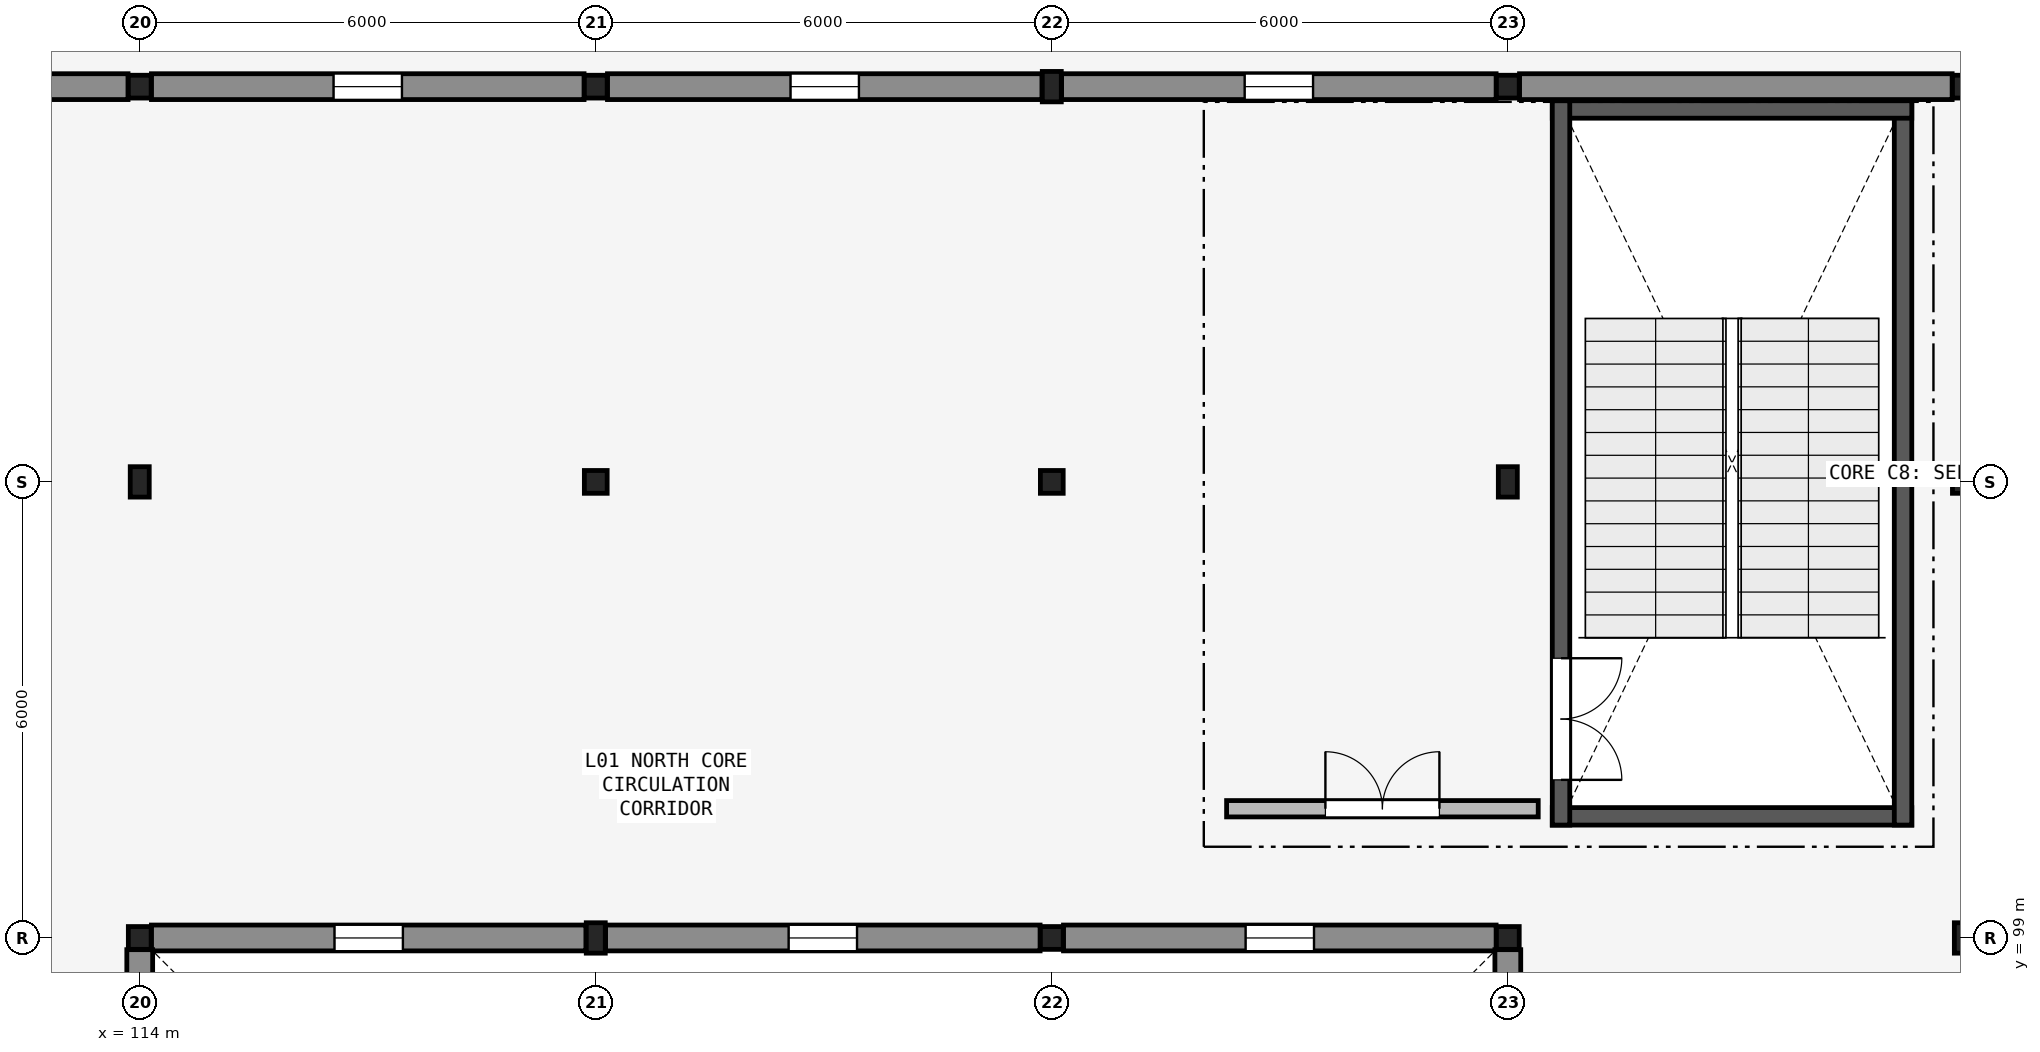
"""IFC4 building model, lengths in metres.
Left out: names, types, materials, properties, quantities, classifications, styles, units other than length and angle.
Written with IfcOpenShell. Run it as: python <this file> out.ifc"""

import sys

from ifc_helpers import new_model, si_unit, direction, frame, frame_2d, origin, origin_2d, place, context, subcontext, project, spatial, rectangle, hollow_rectangle, i_section, extrude, element, fill, save


model = new_model("IFC4")
c1 = context("Model", 3, precision=1e-05, world=origin(), true_north=direction((0.0, 1.0)))
c2 = subcontext(c1, "Body", "Model", "MODEL_VIEW")
j1 = project(units=[si_unit("LENGTHUNIT", "METRE"), si_unit("PLANEANGLEUNIT", "RADIAN")], contexts=[c1])
p1 = place(None, origin())
s1 = spatial("IfcSite", under=j1, at=p1, CompositionType="ELEMENT")
p2 = place(p1, origin())
s2 = spatial("IfcBuilding", under=s1, at=p2, CompositionType="ELEMENT")
p3 = place(p2, frame((0.0, 0.0, 4.8)))
s3 = spatial("IfcBuildingStorey", under=s2, at=p3, CompositionType="ELEMENT", Elevation=4.8)
p4 = place(p3, frame((114.0, 99.0, 0.0), z_axis=(0.0, 0.0, 1.0), x_axis=(1.0, 0.0, 0.0)))
e1 = element("IfcColumn", 1, at=p4, inside=s3, PredefinedType="COLUMN", context=c2, shape_type="SweptSolid", body=[
    extrude(hollow_rectangle(XDim=0.3, YDim=0.3, WallThickness=0.016, InnerFilletRadius=0.016, OuterFilletRadius=0.032, at=origin_2d()), origin(), (0.0, 0.0, 1.0), 4.5),
])
p5 = place(p3, frame((114.0, 105.0, 0.0), z_axis=(0.0, 0.0, 1.0), x_axis=(1.0, 0.0, 0.0)))
e2 = element("IfcColumn", 2, at=p5, inside=s3, PredefinedType="COLUMN", context=c2, shape_type="SweptSolid", body=[
    extrude(i_section(OverallWidth=0.25, OverallDepth=0.4, WebThickness=0.01, FlangeThickness=0.013, FilletRadius=0.014, at=origin_2d()), origin(), (0.0, 0.0, 1.0), 4.5),
])
p6 = place(p3, frame((114.0, 110.2, 0.0), z_axis=(0.0, 0.0, 1.0), x_axis=(1.0, 0.0, 0.0)))
e3 = element("IfcColumn", 3, at=p6, inside=s3, PredefinedType="COLUMN", context=c2, shape_type="SweptSolid", body=[
    extrude(hollow_rectangle(XDim=0.3, YDim=0.3, WallThickness=0.016, InnerFilletRadius=0.016, OuterFilletRadius=0.032, at=origin_2d()), origin(), (0.0, 0.0, 1.0), 4.5),
])
p7 = place(p3, frame((120.0, 99.0, 0.0), z_axis=(0.0, 0.0, 1.0), x_axis=(1.0, 0.0, 0.0)))
e4 = element("IfcColumn", 4, at=p7, inside=s3, PredefinedType="COLUMN", context=c2, shape_type="SweptSolid", body=[
    extrude(i_section(OverallWidth=0.25, OverallDepth=0.4, WebThickness=0.01, FlangeThickness=0.013, FilletRadius=0.014, at=origin_2d()), origin(), (0.0, 0.0, 1.0), 4.5),
])
for number, where, z_axis, x_axis in (
    (5, (120.0, 105.0, 0.0), (0.0, 0.0, 1.0), (1.0, 0.0, 0.0)),
    (6, (120.0, 110.2, 0.0), (0.0, 0.0, 1.0), (1.0, 0.0, 0.0)),
    (7, (126.0, 99.0, 0.0), (0.0, 0.0, 1.0), (1.0, 0.0, 0.0)),
    (8, (126.0, 105.0, 0.0), (0.0, 0.0, 1.0), (1.0, 0.0, 0.0)),
):
    element("IfcColumn", number, at=place(p3, frame(where, z_axis=z_axis, x_axis=x_axis)), inside=s3, PredefinedType="COLUMN", context=c2, shape_type="SweptSolid", body=[
        extrude(hollow_rectangle(XDim=0.3, YDim=0.3, WallThickness=0.016, InnerFilletRadius=0.016, OuterFilletRadius=0.032, at=origin_2d()), origin(), (0.0, 0.0, 1.0), 4.5),
    ])
p8 = place(p3, frame((126.0, 110.2, 0.0), z_axis=(0.0, 0.0, 1.0), x_axis=(1.0, 0.0, 0.0)))
e9 = element("IfcColumn", 9, at=p8, inside=s3, PredefinedType="COLUMN", context=c2, shape_type="SweptSolid", body=[
    extrude(i_section(OverallWidth=0.25, OverallDepth=0.4, WebThickness=0.01, FlangeThickness=0.013, FilletRadius=0.014, at=origin_2d()), origin(), (0.0, 0.0, 1.0), 4.5),
])
p9 = place(p3, frame((132.0, 99.0, 0.0), z_axis=(0.0, 0.0, 1.0), x_axis=(1.0, 0.0, 0.0)))
e10 = element("IfcColumn", 10, at=p9, inside=s3, PredefinedType="COLUMN", context=c2, shape_type="SweptSolid", body=[
    extrude(hollow_rectangle(XDim=0.3, YDim=0.3, WallThickness=0.016, InnerFilletRadius=0.016, OuterFilletRadius=0.032, at=origin_2d()), origin(), (0.0, 0.0, 1.0), 4.5),
])
p10 = place(p3, frame((132.0, 105.0, 0.0), z_axis=(0.0, 0.0, 1.0), x_axis=(1.0, 0.0, 0.0)))
e11 = element("IfcColumn", 11, at=p10, inside=s3, PredefinedType="COLUMN", context=c2, shape_type="SweptSolid", body=[
    extrude(i_section(OverallWidth=0.25, OverallDepth=0.4, WebThickness=0.01, FlangeThickness=0.013, FilletRadius=0.014, at=origin_2d()), origin(), (0.0, 0.0, 1.0), 4.5),
])
p11 = place(p3, frame((132.0, 110.2, 0.0), z_axis=(0.0, 0.0, 1.0), x_axis=(1.0, 0.0, 0.0)))
e12 = element("IfcColumn", 12, at=p11, inside=s3, PredefinedType="COLUMN", context=c2, shape_type="SweptSolid", body=[
    extrude(hollow_rectangle(XDim=0.3, YDim=0.3, WallThickness=0.016, InnerFilletRadius=0.016, OuterFilletRadius=0.032, at=origin_2d()), origin(), (0.0, 0.0, 1.0), 4.5),
])
p12 = place(p3, frame((138.0, 99.0, 0.0), z_axis=(0.0, 0.0, 1.0), x_axis=(1.0, 0.0, 0.0)))
e13 = element("IfcColumn", 13, at=p12, inside=s3, PredefinedType="COLUMN", context=c2, shape_type="SweptSolid", body=[
    extrude(i_section(OverallWidth=0.25, OverallDepth=0.4, WebThickness=0.01, FlangeThickness=0.013, FilletRadius=0.014, at=origin_2d()), origin(), (0.0, 0.0, 1.0), 4.5),
])
for number, where, z_axis, x_axis in (
    (14, (138.0, 105.0, 0.0), (0.0, 0.0, 1.0), (1.0, 0.0, 0.0)),
    (15, (138.0, 110.2, 0.0), (0.0, 0.0, 1.0), (1.0, 0.0, 0.0)),
):
    element("IfcColumn", number, at=place(p3, frame(where, z_axis=z_axis, x_axis=x_axis)), inside=s3, PredefinedType="COLUMN", context=c2, shape_type="SweptSolid", body=[
        extrude(hollow_rectangle(XDim=0.3, YDim=0.3, WallThickness=0.016, InnerFilletRadius=0.016, OuterFilletRadius=0.032, at=origin_2d()), origin(), (0.0, 0.0, 1.0), 4.5),
    ])
p13 = place(p3, frame((108.129, 110.2, 0.0), z_axis=(0.0, 0.0, 1.0), x_axis=(1.0, 0.0, 0.0)))
e16 = element("IfcWall", 16, at=p13, inside=s3, PredefinedType="SOLIDWALL", context=c2, shape_type="SweptSolid", body=[
    extrude(rectangle(XDim=5.717, YDim=0.34, at=frame_2d((2.858, 0.0))), origin(), (0.0, 0.0, 1.0), 3.84),
])
p14 = place(p13, frame((2.408, 0.0, 1.6)))
e17 = element("IfcOpeningElement", 17, at=p14, cuts=e16, PredefinedType="OPENING", context=c2, shape_type="SweptSolid", body=[
    extrude(rectangle(XDim=0.9, YDim=0.6, at=frame_2d((0.45, 0.3))), frame((0.0, 0.18, 0.0), z_axis=(0.0, -1.0, 0.0), x_axis=(1.0, 0.0, 0.0)), (0.0, 0.0, 1.0), 0.36),
])
p15 = place(p3, frame((114.154, 110.2, 0.0), z_axis=(0.0, 0.0, 1.0), x_axis=(1.0, 0.0, 0.0)))
e18 = element("IfcWall", 18, at=p15, inside=s3, PredefinedType="SOLIDWALL", context=c2, shape_type="SweptSolid", body=[
    extrude(rectangle(XDim=5.692, YDim=0.34, at=frame_2d((2.846, 0.0))), origin(), (0.0, 0.0, 1.0), 3.84),
])
p16 = place(p15, frame((2.396, 0.0, 1.6)))
e19 = element("IfcOpeningElement", 19, at=p16, cuts=e18, PredefinedType="OPENING", context=c2, shape_type="SweptSolid", body=[
    extrude(rectangle(XDim=0.9, YDim=0.6, at=frame_2d((0.45, 0.3))), frame((0.0, 0.18, 0.0), z_axis=(0.0, -1.0, 0.0), x_axis=(1.0, 0.0, 0.0)), (0.0, 0.0, 1.0), 0.36),
])
p17 = place(p3, frame((120.154, 110.2, 0.0), z_axis=(0.0, 0.0, 1.0), x_axis=(1.0, 0.0, 0.0)))
e20 = element("IfcWall", 20, at=p17, inside=s3, PredefinedType="SOLIDWALL", context=c2, shape_type="SweptSolid", body=[
    extrude(rectangle(XDim=5.717, YDim=0.34, at=frame_2d((2.858, 0.0))), origin(), (0.0, 0.0, 1.0), 3.84),
])
p18 = place(p17, frame((2.408, 0.0, 1.6)))
e21 = element("IfcOpeningElement", 21, at=p18, cuts=e20, PredefinedType="OPENING", context=c2, shape_type="SweptSolid", body=[
    extrude(rectangle(XDim=0.9, YDim=0.6, at=frame_2d((0.45, 0.3))), frame((0.0, 0.18, 0.0), z_axis=(0.0, -1.0, 0.0), x_axis=(1.0, 0.0, 0.0)), (0.0, 0.0, 1.0), 0.36),
])
p19 = place(p3, frame((126.129, 110.2, 0.0), z_axis=(0.0, 0.0, 1.0), x_axis=(1.0, 0.0, 0.0)))
e22 = element("IfcWall", 22, at=p19, inside=s3, PredefinedType="SOLIDWALL", context=c2, shape_type="SweptSolid", body=[
    extrude(rectangle(XDim=5.717, YDim=0.34, at=frame_2d((2.858, 0.0))), origin(), (0.0, 0.0, 1.0), 3.84),
])
p20 = place(p19, frame((2.408, 0.0, 1.6)))
e23 = element("IfcOpeningElement", 23, at=p20, cuts=e22, PredefinedType="OPENING", context=c2, shape_type="SweptSolid", body=[
    extrude(rectangle(XDim=0.9, YDim=0.6, at=frame_2d((0.45, 0.3))), frame((0.0, 0.18, 0.0), z_axis=(0.0, -1.0, 0.0), x_axis=(1.0, 0.0, 0.0)), (0.0, 0.0, 1.0), 0.36),
])
p21 = place(p3, frame((132.154, 110.2, 0.0), z_axis=(0.0, 0.0, 1.0), x_axis=(1.0, 0.0, 0.0)))
e24 = element("IfcWall", 24, at=p21, inside=s3, PredefinedType="SOLIDWALL", context=c2, shape_type="SweptSolid", body=[
    extrude(rectangle(XDim=5.692, YDim=0.34, at=frame_2d((2.846, 0.0))), origin(), (0.0, 0.0, 1.0), 3.84),
])
p22 = place(p3, frame((114.154, 99.0, 0.0), z_axis=(0.0, 0.0, 1.0), x_axis=(1.0, 0.0, 0.0)))
e25 = element("IfcWall", 25, at=p22, inside=s3, PredefinedType="SOLIDWALL", context=c2, shape_type="SweptSolid", body=[
    extrude(rectangle(XDim=5.717, YDim=0.34, at=frame_2d((2.858, 0.0))), origin(), (0.0, 0.0, 1.0), 3.783),
])
p23 = place(p22, frame((2.408, 0.0, 1.6)))
e26 = element("IfcOpeningElement", 26, at=p23, cuts=e25, PredefinedType="OPENING", context=c2, shape_type="SweptSolid", body=[
    extrude(rectangle(XDim=0.9, YDim=0.6, at=frame_2d((0.45, 0.3))), frame((0.0, 0.18, 0.0), z_axis=(0.0, -1.0, 0.0), x_axis=(1.0, 0.0, 0.0)), (0.0, 0.0, 1.0), 0.36),
])
p24 = place(p3, frame((120.129, 99.0, 0.0), z_axis=(0.0, 0.0, 1.0), x_axis=(1.0, 0.0, 0.0)))
e27 = element("IfcWall", 27, at=p24, inside=s3, PredefinedType="SOLIDWALL", context=c2, shape_type="SweptSolid", body=[
    extrude(rectangle(XDim=5.717, YDim=0.34, at=frame_2d((2.858, 0.0))), origin(), (0.0, 0.0, 1.0), 3.783),
])
p25 = place(p24, frame((2.408, 0.0, 1.6)))
e28 = element("IfcOpeningElement", 28, at=p25, cuts=e27, PredefinedType="OPENING", context=c2, shape_type="SweptSolid", body=[
    extrude(rectangle(XDim=0.9, YDim=0.6, at=frame_2d((0.45, 0.3))), frame((0.0, 0.18, 0.0), z_axis=(0.0, -1.0, 0.0), x_axis=(1.0, 0.0, 0.0)), (0.0, 0.0, 1.0), 0.36),
])
p26 = place(p3, frame((126.154, 99.0, 0.0), z_axis=(0.0, 0.0, 1.0), x_axis=(1.0, 0.0, 0.0)))
e29 = element("IfcWall", 29, at=p26, inside=s3, PredefinedType="SOLIDWALL", context=c2, shape_type="SweptSolid", body=[
    extrude(rectangle(XDim=5.692, YDim=0.34, at=frame_2d((2.846, 0.0))), origin(), (0.0, 0.0, 1.0), 3.783),
])
p27 = place(p26, frame((2.396, 0.0, 1.6)))
e30 = element("IfcOpeningElement", 30, at=p27, cuts=e29, PredefinedType="OPENING", context=c2, shape_type="SweptSolid", body=[
    extrude(rectangle(XDim=0.9, YDim=0.6, at=frame_2d((0.45, 0.3))), frame((0.0, 0.18, 0.0), z_axis=(0.0, -1.0, 0.0), x_axis=(1.0, 0.0, 0.0)), (0.0, 0.0, 1.0), 0.36),
])
p28 = place(p3, frame((114.0, 93.154, 0.0), z_axis=(0.0, 0.0, 1.0), x_axis=(0.0, 1.0, 0.0)))
e31 = element("IfcWall", 31, at=p28, inside=s3, PredefinedType="SOLIDWALL", context=c2, shape_type="SweptSolid", body=[
    extrude(rectangle(XDim=5.692, YDim=0.34, at=frame_2d((2.846, 0.0))), origin(), (0.0, 0.0, 1.0), 3.59),
])
p29 = place(p28, frame((2.396, 0.0, 1.6)))
e32 = element("IfcOpeningElement", 32, at=p29, cuts=e31, PredefinedType="OPENING", context=c2, shape_type="SweptSolid", body=[
    extrude(rectangle(XDim=0.9, YDim=0.6, at=frame_2d((0.45, 0.3))), frame((0.0, 0.18, 0.0), z_axis=(0.0, -1.0, 0.0), x_axis=(1.0, 0.0, 0.0)), (0.0, 0.0, 1.0), 0.36),
])
p30 = place(p3, frame((132.0, 93.154, 0.0), z_axis=(0.0, 0.0, 1.0), x_axis=(0.0, 1.0, 0.0)))
e33 = element("IfcWall", 33, at=p30, inside=s3, PredefinedType="SOLIDWALL", context=c2, shape_type="SweptSolid", body=[
    extrude(rectangle(XDim=5.692, YDim=0.34, at=frame_2d((2.846, 0.0))), origin(), (0.0, 0.0, 1.0), 3.59),
])
p31 = place(p30, frame((2.396, 0.0, 1.6)))
e34 = element("IfcOpeningElement", 34, at=p31, cuts=e33, PredefinedType="OPENING", context=c2, shape_type="SweptSolid", body=[
    extrude(rectangle(XDim=0.9, YDim=0.6, at=frame_2d((0.45, 0.3))), frame((0.0, 0.18, 0.0), z_axis=(0.0, -1.0, 0.0), x_axis=(1.0, 0.0, 0.0)), (0.0, 0.0, 1.0), 0.36),
])
p32 = place(p3, frame((132.585, 100.6, 0.0), z_axis=(0.0, 0.0, 1.0), x_axis=(1.0, 0.0, 0.0)))
e35 = element("IfcWall", 35, at=p32, inside=s3, PredefinedType="SHEAR", context=c2, shape_type="SweptSolid", body=[
    extrude(rectangle(XDim=4.73, YDim=0.23, at=frame_2d((2.365, 0.0))), origin(), (0.0, 0.0, 1.0), 4.36),
])
p33 = place(p3, frame((137.2, 100.485, 0.0), z_axis=(0.0, 0.0, 1.0), x_axis=(0.0, 1.0, 0.0)))
e36 = element("IfcWall", 36, at=p33, inside=s3, PredefinedType="SHEAR", context=c2, shape_type="SweptSolid", body=[
    extrude(rectangle(XDim=9.53, YDim=0.23, at=frame_2d((4.765, 0.0))), origin(), (0.0, 0.0, 1.0), 4.36),
])
p34 = place(p3, frame((137.315, 109.9, 0.0), z_axis=(0.0, 0.0, 1.0), x_axis=(-1.0, 0.0, 0.0)))
e37 = element("IfcWall", 37, at=p34, inside=s3, PredefinedType="SHEAR", context=c2, shape_type="SweptSolid", body=[
    extrude(rectangle(XDim=4.73, YDim=0.23, at=frame_2d((2.365, 0.0))), origin(), (0.0, 0.0, 1.0), 4.36),
])
p35 = place(p3, frame((132.7, 110.015, 0.0), z_axis=(0.0, 0.0, 1.0), x_axis=(0.0, -1.0, 0.0)))
e38 = element("IfcWall", 38, at=p35, inside=s3, PredefinedType="SHEAR", context=c2, shape_type="SweptSolid", body=[
    extrude(rectangle(XDim=9.53, YDim=0.23, at=frame_2d((4.765, 0.0))), origin(), (0.0, 0.0, 1.0), 4.36),
])
p36 = place(p35, frame((7.335, 0.0, 0.0)))
e39 = element("IfcOpeningElement", 39, at=p36, cuts=e38, PredefinedType="OPENING", context=c2, shape_type="SweptSolid", body=[
    extrude(rectangle(XDim=1.6, YDim=2.2, at=frame_2d((0.8, 1.1))), frame((0.0, 0.125, 0.0), z_axis=(0.0, -1.0, 0.0), x_axis=(1.0, 0.0, 0.0)), (0.0, 0.0, 1.0), 0.25),
])
p37 = place(p3, frame((128.3, 100.7, 0.0), z_axis=(0.0, 0.0, 1.0), x_axis=(1.0, 0.0, 0.0)))
e40 = element("IfcWall", 40, at=p37, inside=s3, PredefinedType="PARTITIONING", context=c2, shape_type="SweptSolid", body=[
    extrude(rectangle(XDim=4.1, YDim=0.215, at=frame_2d((2.05, 0.0))), origin(), (0.0, 0.0, 1.0), 3.783),
])
p38 = place(p37, frame((1.3, 0.0, 0.0)))
e41 = element("IfcOpeningElement", 41, at=p38, cuts=e40, PredefinedType="OPENING", context=c2, shape_type="SweptSolid", body=[
    extrude(rectangle(XDim=1.5, YDim=2.15, at=frame_2d((0.75, 1.075))), frame((0.0, 0.117, 0.0), z_axis=(0.0, -1.0, 0.0), x_axis=(1.0, 0.0, 0.0)), (0.0, 0.0, 1.0), 0.235),
])
p39 = place(p16, origin())
e42 = element("IfcWindow", 42, at=p39, inside=s3, PartitioningType="SINGLE_PANEL", PredefinedType="WINDOW", context=c2, shape_type="SweptSolid", body=[
    extrude(rectangle(XDim=0.9, YDim=0.6, at=frame_2d((0.45, 0.3))), frame((0.0, 0.03, 0.0), z_axis=(0.0, -1.0, 0.0), x_axis=(1.0, 0.0, 0.0)), (0.0, 0.0, 1.0), 0.06),
])
fill(e19, e42)
p40 = place(p18, origin())
e43 = element("IfcWindow", 43, at=p40, inside=s3, PartitioningType="SINGLE_PANEL", PredefinedType="WINDOW", context=c2, shape_type="SweptSolid", body=[
    extrude(rectangle(XDim=0.9, YDim=0.6, at=frame_2d((0.45, 0.3))), frame((0.0, 0.03, 0.0), z_axis=(0.0, -1.0, 0.0), x_axis=(1.0, 0.0, 0.0)), (0.0, 0.0, 1.0), 0.06),
])
fill(e21, e43)
p41 = place(p20, origin())
e44 = element("IfcWindow", 44, at=p41, inside=s3, PartitioningType="SINGLE_PANEL", PredefinedType="WINDOW", context=c2, shape_type="SweptSolid", body=[
    extrude(rectangle(XDim=0.9, YDim=0.6, at=frame_2d((0.45, 0.3))), frame((0.0, 0.03, 0.0), z_axis=(0.0, -1.0, 0.0), x_axis=(1.0, 0.0, 0.0)), (0.0, 0.0, 1.0), 0.06),
])
fill(e23, e44)
p42 = place(p23, origin())
e45 = element("IfcWindow", 45, at=p42, inside=s3, PartitioningType="SINGLE_PANEL", PredefinedType="WINDOW", context=c2, shape_type="SweptSolid", body=[
    extrude(rectangle(XDim=0.9, YDim=0.6, at=frame_2d((0.45, 0.3))), frame((0.0, 0.03, 0.0), z_axis=(0.0, -1.0, 0.0), x_axis=(1.0, 0.0, 0.0)), (0.0, 0.0, 1.0), 0.06),
])
fill(e26, e45)
p43 = place(p25, origin())
e46 = element("IfcWindow", 46, at=p43, inside=s3, PartitioningType="SINGLE_PANEL", PredefinedType="WINDOW", context=c2, shape_type="SweptSolid", body=[
    extrude(rectangle(XDim=0.9, YDim=0.6, at=frame_2d((0.45, 0.3))), frame((0.0, 0.03, 0.0), z_axis=(0.0, -1.0, 0.0), x_axis=(1.0, 0.0, 0.0)), (0.0, 0.0, 1.0), 0.06),
])
fill(e28, e46)
p44 = place(p27, origin())
e47 = element("IfcWindow", 47, at=p44, inside=s3, PartitioningType="SINGLE_PANEL", PredefinedType="WINDOW", context=c2, shape_type="SweptSolid", body=[
    extrude(rectangle(XDim=0.9, YDim=0.6, at=frame_2d((0.45, 0.3))), frame((0.0, 0.03, 0.0), z_axis=(0.0, -1.0, 0.0), x_axis=(1.0, 0.0, 0.0)), (0.0, 0.0, 1.0), 0.06),
])
fill(e30, e47)
p45 = place(p36, origin())
e48 = element("IfcDoor", 48, at=p45, inside=s3, OperationType="DOUBLE_DOOR_SINGLE_SWING", PredefinedType="DOOR", context=c2, shape_type="SweptSolid", body=[
    extrude(rectangle(XDim=1.6, YDim=2.2, at=frame_2d((0.8, 1.1))), frame((0.0, 0.025, 0.0), z_axis=(0.0, -1.0, 0.0), x_axis=(1.0, 0.0, 0.0)), (0.0, 0.0, 1.0), 0.05),
])
fill(e39, e48)
p46 = place(p38, origin())
e49 = element("IfcDoor", 49, at=p46, inside=s3, OperationType="DOUBLE_DOOR_SINGLE_SWING", PredefinedType="DOOR", context=c2, shape_type="SweptSolid", body=[
    extrude(rectangle(XDim=1.5, YDim=2.15, at=frame_2d((0.75, 1.075))), frame((0.0, 0.025, 0.0), z_axis=(0.0, -1.0, 0.0), x_axis=(1.0, 0.0, 0.0)), (0.0, 0.0, 1.0), 0.05),
])
fill(e41, e49)
save(model, sys.argv[1])
